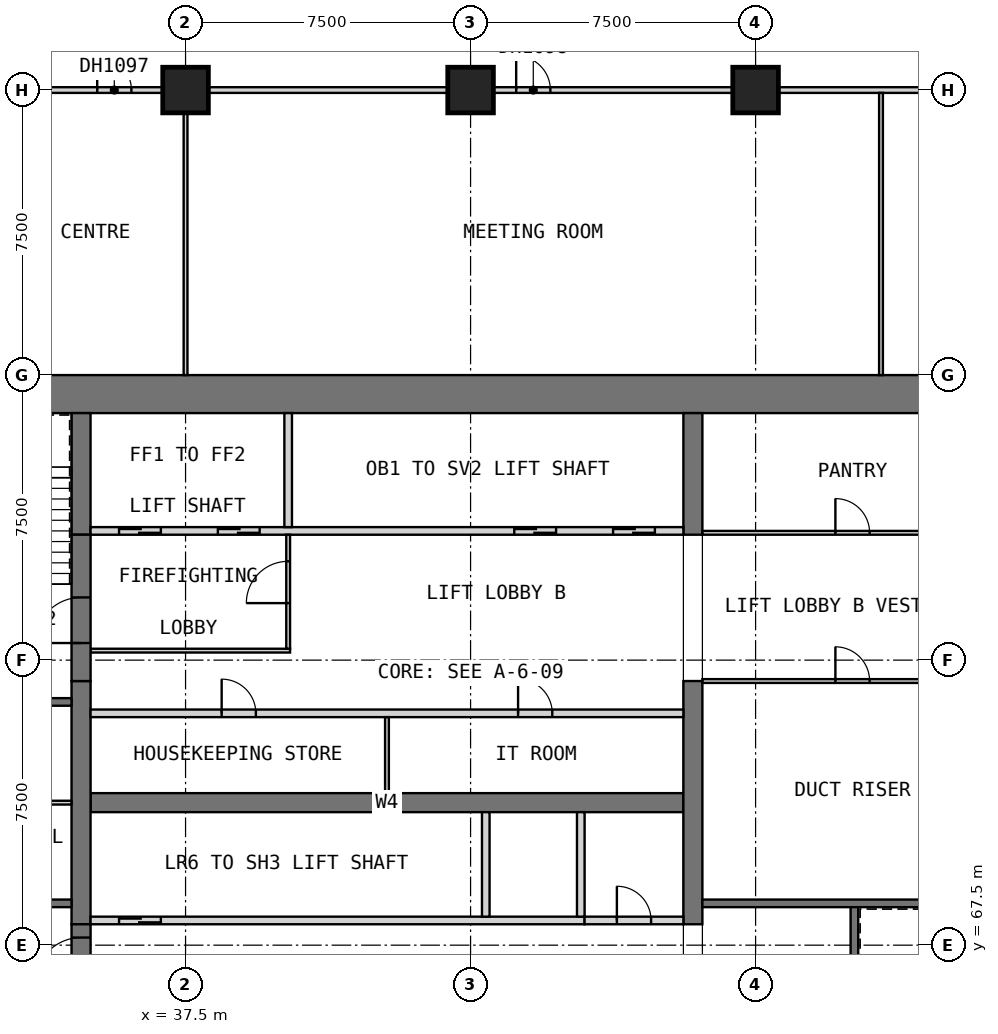
"""IFC4 building model, lengths in metres.
Left out: names, types, materials, properties, quantities, classifications, styles, units other than length and angle.
Written with IfcOpenShell. Run it as: python <this file> out.ifc"""

import sys

from ifc_helpers import new_model, si_unit, direction, frame, frame_2d, origin, origin_2d, place, context, subcontext, project, spatial, rectangle, extrude, element, fill, save


model = new_model("IFC4")
c1 = context("Model", 3, precision=1e-05, world=origin(), true_north=direction((0.0, 1.0)))
c2 = subcontext(c1, "Body", "Model", "MODEL_VIEW")
j1 = project(units=[si_unit("LENGTHUNIT", "METRE"), si_unit("PLANEANGLEUNIT", "RADIAN")], contexts=[c1])
p1 = place(None, origin())
s1 = spatial("IfcSite", under=j1, at=p1, CompositionType="ELEMENT")
p2 = place(p1, origin())
s2 = spatial("IfcBuilding", under=s1, at=p2, CompositionType="ELEMENT")
p3 = place(p2, frame((0.0, 0.0, 34.0)))
s3 = spatial("IfcBuildingStorey", under=s2, at=p3, CompositionType="ELEMENT", Elevation=34.0)
for number, where, z_axis, x_axis in (
    (1, (37.5, 90.0, 0.0), (0.0, 0.0, 1.0), (1.0, 0.0, 0.0)),
    (2, (45.0, 90.0, 0.0), (0.0, 0.0, 1.0), (1.0, 0.0, 0.0)),
    (3, (52.5, 90.0, 0.0), (0.0, 0.0, 1.0), (1.0, 0.0, 0.0)),
):
    element("IfcColumn", number, at=place(p3, frame(where, z_axis=z_axis, x_axis=x_axis)), inside=s3, PredefinedType="COLUMN", context=c2, shape_type="SweptSolid", body=[
        extrude(rectangle(XDim=1.2, YDim=1.2, at=origin_2d()), origin(), (0.0, 0.0, 1.0), 3.6),
    ])
p4 = place(p3, frame((30.0, 82.0, 0.0), z_axis=(0.0, 0.0, 1.0), x_axis=(1.0, 0.0, 0.0)))
e4 = element("IfcWall", 4, at=p4, inside=s3, PredefinedType="SHEAR", context=c2, shape_type="SweptSolid", body=[
    extrude(rectangle(XDim=30.0, YDim=1.0, at=frame_2d((15.0, 0.0))), origin(), (0.0, 0.0, 1.0), 3.6),
])
p5 = place(p3, frame((35.0, 71.25, 0.0), z_axis=(0.0, 0.0, 1.0), x_axis=(1.0, 0.0, 0.0)))
e5 = element("IfcWall", 5, at=p5, inside=s3, PredefinedType="SHEAR", context=c2, shape_type="SweptSolid", body=[
    extrude(rectangle(XDim=15.6, YDim=0.5, at=frame_2d((7.8, 0.0))), origin(), (0.0, 0.0, 1.0), 3.6),
])
p6 = place(p3, frame((34.75, 68.05, 0.0), z_axis=(0.0, 0.0, 1.0), x_axis=(0.0, 1.0, 0.0)))
e6 = element("IfcWall", 6, at=p6, inside=s3, PredefinedType="SHEAR", context=c2, shape_type="SweptSolid", body=[
    extrude(rectangle(XDim=6.4, YDim=0.5, at=frame_2d((3.2, 0.0))), origin(), (0.0, 0.0, 1.0), 3.6),
])
p7 = place(p3, frame((34.75, 78.3, 0.0), z_axis=(0.0, 0.0, 1.0), x_axis=(0.0, 1.0, 0.0)))
e7 = element("IfcWall", 7, at=p7, inside=s3, PredefinedType="SHEAR", context=c2, shape_type="SweptSolid", body=[
    extrude(rectangle(XDim=3.2, YDim=0.5, at=frame_2d((1.6, 0.0))), origin(), (0.0, 0.0, 1.0), 3.6),
])
p8 = place(p3, frame((50.85, 68.05, 0.0), z_axis=(0.0, 0.0, 1.0), x_axis=(0.0, 1.0, 0.0)))
e8 = element("IfcWall", 8, at=p8, inside=s3, PredefinedType="SHEAR", context=c2, shape_type="SweptSolid", body=[
    extrude(rectangle(XDim=6.4, YDim=0.5, at=frame_2d((3.2, 0.0))), origin(), (0.0, 0.0, 1.0), 3.6),
])
p9 = place(p3, frame((50.85, 78.3, 0.0), z_axis=(0.0, 0.0, 1.0), x_axis=(0.0, 1.0, 0.0)))
e9 = element("IfcWall", 9, at=p9, inside=s3, PredefinedType="SHEAR", context=c2, shape_type="SweptSolid", body=[
    extrude(rectangle(XDim=3.2, YDim=0.5, at=frame_2d((1.6, 0.0))), origin(), (0.0, 0.0, 1.0), 3.6),
])
p10 = place(p3, frame((35.0, 68.15, 0.0), z_axis=(0.0, 0.0, 1.0), x_axis=(1.0, 0.0, 0.0)))
e10 = element("IfcWall", 10, at=p10, inside=s3, PredefinedType="SOLIDWALL", context=c2, shape_type="SweptSolid", body=[
    extrude(rectangle(XDim=13.0, YDim=0.2, at=frame_2d((6.5, 0.0))), origin(), (0.0, 0.0, 1.0), 3.6),
])
p11 = place(p10, frame((0.75, 0.0, 0.0)))
e11 = element("IfcOpeningElement", 11, at=p11, cuts=e10, PredefinedType="OPENING", context=c2, shape_type="SweptSolid", body=[
    extrude(rectangle(XDim=1.1, YDim=2.1, at=frame_2d((0.55, 1.05))), frame((0.0, 0.11, 0.0), z_axis=(0.0, -1.0, 0.0), x_axis=(1.0, 0.0, 0.0)), (0.0, 0.0, 1.0), 0.22),
])
for number, where, z_axis, x_axis in (
    (12, (45.4, 68.25, 0.0), (0.0, 0.0, 1.0), (0.0, 1.0, 0.0)),
    (13, (47.9, 68.25, 0.0), (0.0, 0.0, 1.0), (0.0, 1.0, 0.0)),
):
    element("IfcWall", number, at=place(p3, frame(where, z_axis=z_axis, x_axis=x_axis)), inside=s3, PredefinedType="SOLIDWALL", context=c2, shape_type="SweptSolid", body=[
        extrude(rectangle(XDim=2.75, YDim=0.2, at=frame_2d((1.375, 0.0))), origin(), (0.0, 0.0, 1.0), 3.6),
    ])
p12 = place(p3, frame((48.0, 68.15, 0.0), z_axis=(0.0, 0.0, 1.0), x_axis=(1.0, 0.0, 0.0)))
e14 = element("IfcWall", 14, at=p12, inside=s3, PredefinedType="PARTITIONING", context=c2, shape_type="SweptSolid", body=[
    extrude(rectangle(XDim=2.6, YDim=0.2, at=frame_2d((1.3, 0.0))), origin(), (0.0, 0.0, 1.0), 3.35),
])
p13 = place(p12, frame((0.85, 0.0, 0.0)))
e15 = element("IfcOpeningElement", 15, at=p13, cuts=e14, PredefinedType="OPENING", context=c2, shape_type="SweptSolid", body=[
    extrude(rectangle(XDim=0.9, YDim=2.1, at=frame_2d((0.45, 1.05))), frame((0.0, 0.11, 0.0), z_axis=(0.0, -1.0, 0.0), x_axis=(1.0, 0.0, 0.0)), (0.0, 0.0, 1.0), 0.22),
])
p14 = place(p3, frame((35.0, 73.6, 0.0), z_axis=(0.0, 0.0, 1.0), x_axis=(1.0, 0.0, 0.0)))
e16 = element("IfcWall", 16, at=p14, inside=s3, PredefinedType="PARTITIONING", context=c2, shape_type="SweptSolid", body=[
    extrude(rectangle(XDim=15.6, YDim=0.2, at=frame_2d((7.8, 0.0))), origin(), (0.0, 0.0, 1.0), 3.35),
])
p15 = place(p14, frame((3.45, 0.0, 0.0)))
e17 = element("IfcOpeningElement", 17, at=p15, cuts=e16, PredefinedType="OPENING", context=c2, shape_type="SweptSolid", body=[
    extrude(rectangle(XDim=0.9, YDim=2.1, at=frame_2d((0.45, 1.05))), frame((0.0, 0.11, 0.0), z_axis=(0.0, -1.0, 0.0), x_axis=(1.0, 0.0, 0.0)), (0.0, 0.0, 1.0), 0.22),
])
p16 = place(p14, frame((11.25, 0.0, 0.0)))
e18 = element("IfcOpeningElement", 18, at=p16, cuts=e16, PredefinedType="OPENING", context=c2, shape_type="SweptSolid", body=[
    extrude(rectangle(XDim=0.9, YDim=2.1, at=frame_2d((0.45, 1.05))), frame((0.0, 0.11, 0.0), z_axis=(0.0, -1.0, 0.0), x_axis=(1.0, 0.0, 0.0)), (0.0, 0.0, 1.0), 0.22),
])
p17 = place(p3, frame((42.8, 71.5, 0.0), z_axis=(0.0, 0.0, 1.0), x_axis=(0.0, 1.0, 0.0)))
e19 = element("IfcWall", 19, at=p17, inside=s3, PredefinedType="PARTITIONING", context=c2, shape_type="SweptSolid", body=[
    extrude(rectangle(XDim=2.0, YDim=0.1, at=frame_2d((1.0, 0.0))), origin(), (0.0, 0.0, 1.0), 3.35),
])
p18 = place(p3, frame((35.0, 78.4, 0.0), z_axis=(0.0, 0.0, 1.0), x_axis=(1.0, 0.0, 0.0)))
e20 = element("IfcWall", 20, at=p18, inside=s3, PredefinedType="SOLIDWALL", context=c2, shape_type="SweptSolid", body=[
    extrude(rectangle(XDim=15.6, YDim=0.2, at=frame_2d((7.8, 0.0))), origin(), (0.0, 0.0, 1.0), 3.6),
])
p19 = place(p18, frame((0.75, 0.0, 0.0)))
e21 = element("IfcOpeningElement", 21, at=p19, cuts=e20, PredefinedType="OPENING", context=c2, shape_type="SweptSolid", body=[
    extrude(rectangle(XDim=1.1, YDim=2.1, at=frame_2d((0.55, 1.05))), frame((0.0, 0.11, 0.0), z_axis=(0.0, -1.0, 0.0), x_axis=(1.0, 0.0, 0.0)), (0.0, 0.0, 1.0), 0.22),
])
p20 = place(p18, frame((3.35, 0.0, 0.0)))
e22 = element("IfcOpeningElement", 22, at=p20, cuts=e20, PredefinedType="OPENING", context=c2, shape_type="SweptSolid", body=[
    extrude(rectangle(XDim=1.1, YDim=2.1, at=frame_2d((0.55, 1.05))), frame((0.0, 0.11, 0.0), z_axis=(0.0, -1.0, 0.0), x_axis=(1.0, 0.0, 0.0)), (0.0, 0.0, 1.0), 0.22),
])
p21 = place(p18, frame((11.15, 0.0, 0.0)))
e23 = element("IfcOpeningElement", 23, at=p21, cuts=e20, PredefinedType="OPENING", context=c2, shape_type="SweptSolid", body=[
    extrude(rectangle(XDim=1.1, YDim=2.1, at=frame_2d((0.55, 1.05))), frame((0.0, 0.11, 0.0), z_axis=(0.0, -1.0, 0.0), x_axis=(1.0, 0.0, 0.0)), (0.0, 0.0, 1.0), 0.22),
])
p22 = place(p18, frame((13.75, 0.0, 0.0)))
e24 = element("IfcOpeningElement", 24, at=p22, cuts=e20, PredefinedType="OPENING", context=c2, shape_type="SweptSolid", body=[
    extrude(rectangle(XDim=1.1, YDim=2.1, at=frame_2d((0.55, 1.05))), frame((0.0, 0.11, 0.0), z_axis=(0.0, -1.0, 0.0), x_axis=(1.0, 0.0, 0.0)), (0.0, 0.0, 1.0), 0.22),
])
p23 = place(p3, frame((40.2, 78.5, 0.0), z_axis=(0.0, 0.0, 1.0), x_axis=(0.0, 1.0, 0.0)))
e25 = element("IfcWall", 25, at=p23, inside=s3, PredefinedType="SOLIDWALL", context=c2, shape_type="SweptSolid", body=[
    extrude(rectangle(XDim=3.0, YDim=0.2, at=frame_2d((1.5, 0.0))), origin(), (0.0, 0.0, 1.0), 3.6),
])
p24 = place(p3, frame((35.0, 75.25, 0.0), z_axis=(0.0, 0.0, 1.0), x_axis=(1.0, 0.0, 0.0)))
e26 = element("IfcWall", 26, at=p24, inside=s3, PredefinedType="PARTITIONING", context=c2, shape_type="SweptSolid", body=[
    extrude(rectangle(XDim=5.25, YDim=0.1, at=frame_2d((2.625, 0.0))), origin(), (0.0, 0.0, 1.0), 3.35),
])
p25 = place(p3, frame((40.2, 75.3, 0.0), z_axis=(0.0, 0.0, 1.0), x_axis=(0.0, 1.0, 0.0)))
e27 = element("IfcWall", 27, at=p25, inside=s3, PredefinedType="PARTITIONING", context=c2, shape_type="SweptSolid", body=[
    extrude(rectangle(XDim=3.0, YDim=0.1, at=frame_2d((1.5, 0.0))), origin(), (0.0, 0.0, 1.0), 3.35),
])
p26 = place(p25, frame((1.2, 0.0, 0.0)))
e28 = element("IfcOpeningElement", 28, at=p26, cuts=e27, PredefinedType="OPENING", context=c2, shape_type="SweptSolid", body=[
    extrude(rectangle(XDim=1.1, YDim=2.1, at=frame_2d((0.55, 1.05))), frame((0.0, 0.06, 0.0), z_axis=(0.0, -1.0, 0.0), x_axis=(1.0, 0.0, 0.0)), (0.0, 0.0, 1.0), 0.12),
])
p27 = place(p3, frame((34.75, 64.2, 0.0), z_axis=(0.0, 0.0, 1.0), x_axis=(0.0, 1.0, 0.0)))
e29 = element("IfcWall", 29, at=p27, inside=s3, PredefinedType="SOLIDWALL", context=c2, shape_type="SweptSolid", body=[
    extrude(rectangle(XDim=3.85, YDim=0.5, at=frame_2d((1.925, 0.0))), origin(), (0.0, 0.0, 1.0), 2.4),
])
p28 = place(p27, frame((2.3, 0.0, 0.0)))
e30 = element("IfcOpeningElement", 30, at=p28, cuts=e29, PredefinedType="OPENING", context=c2, shape_type="SweptSolid", body=[
    extrude(rectangle(XDim=1.2, YDim=2.1, at=frame_2d((0.6, 1.05))), frame((0.0, 0.26, 0.0), z_axis=(0.0, -1.0, 0.0), x_axis=(1.0, 0.0, 0.0)), (0.0, 0.0, 1.0), 0.52),
])
p29 = place(p3, frame((34.75, 74.45, 0.0), z_axis=(0.0, 0.0, 1.0), x_axis=(0.0, 1.0, 0.0)))
e31 = element("IfcWall", 31, at=p29, inside=s3, PredefinedType="SOLIDWALL", context=c2, shape_type="SweptSolid", body=[
    extrude(rectangle(XDim=3.85, YDim=0.5, at=frame_2d((1.925, 0.0))), origin(), (0.0, 0.0, 1.0), 2.4),
])
p30 = place(p29, frame((1.0, 0.0, 0.0)))
e32 = element("IfcOpeningElement", 32, at=p30, cuts=e31, PredefinedType="OPENING", context=c2, shape_type="SweptSolid", body=[
    extrude(rectangle(XDim=1.2, YDim=2.1, at=frame_2d((0.6, 1.05))), frame((0.0, 0.26, 0.0), z_axis=(0.0, -1.0, 0.0), x_axis=(1.0, 0.0, 0.0)), (0.0, 0.0, 1.0), 0.52),
])
p31 = place(p3, frame((31.0, 68.6, 0.0), z_axis=(0.0, 0.0, 1.0), x_axis=(1.0, 0.0, 0.0)))
e33 = element("IfcWall", 33, at=p31, inside=s3, PredefinedType="SOLIDWALL", context=c2, shape_type="SweptSolid", body=[
    extrude(rectangle(XDim=3.5, YDim=0.2, at=frame_2d((1.75, 0.0))), origin(), (0.0, 0.0, 1.0), 3.35),
])
p32 = place(p31, frame((1.3, 0.0, 0.0)))
e34 = element("IfcOpeningElement", 34, at=p32, cuts=e33, PredefinedType="OPENING", context=c2, shape_type="SweptSolid", body=[
    extrude(rectangle(XDim=0.9, YDim=2.1, at=frame_2d((0.45, 1.05))), frame((0.0, 0.11, 0.0), z_axis=(0.0, -1.0, 0.0), x_axis=(1.0, 0.0, 0.0)), (0.0, 0.0, 1.0), 0.22),
])
p33 = place(p3, frame((31.0, 73.9, 0.0), z_axis=(0.0, 0.0, 1.0), x_axis=(1.0, 0.0, 0.0)))
e35 = element("IfcWall", 35, at=p33, inside=s3, PredefinedType="SOLIDWALL", context=c2, shape_type="SweptSolid", body=[
    extrude(rectangle(XDim=3.5, YDim=0.2, at=frame_2d((1.75, 0.0))), origin(), (0.0, 0.0, 1.0), 3.35),
])
p34 = place(p33, frame((1.3, 0.0, 0.0)))
e36 = element("IfcOpeningElement", 36, at=p34, cuts=e35, PredefinedType="OPENING", context=c2, shape_type="SweptSolid", body=[
    extrude(rectangle(XDim=0.9, YDim=2.1, at=frame_2d((0.45, 1.05))), frame((0.0, 0.11, 0.0), z_axis=(0.0, -1.0, 0.0), x_axis=(1.0, 0.0, 0.0)), (0.0, 0.0, 1.0), 0.22),
])
p35 = place(p3, frame((55.1, 61.0, 0.0), z_axis=(0.0, 0.0, 1.0), x_axis=(0.0, 1.0, 0.0)))
e37 = element("IfcWall", 37, at=p35, inside=s3, PredefinedType="SOLIDWALL", context=c2, shape_type="SweptSolid", body=[
    extrude(rectangle(XDim=7.6, YDim=0.2, at=frame_2d((3.8, 0.0))), origin(), (0.0, 0.0, 1.0), 3.35),
])
p36 = place(p3, frame((51.1, 68.6, 0.0), z_axis=(0.0, 0.0, 1.0), x_axis=(1.0, 0.0, 0.0)))
e38 = element("IfcWall", 38, at=p36, inside=s3, PredefinedType="SOLIDWALL", context=c2, shape_type="SweptSolid", body=[
    extrude(rectangle(XDim=7.9, YDim=0.2, at=frame_2d((3.95, 0.0))), origin(), (0.0, 0.0, 1.0), 3.35),
])
p37 = place(p3, frame((31.0, 71.25, 0.0), z_axis=(0.0, 0.0, 1.0), x_axis=(1.0, 0.0, 0.0)))
e39 = element("IfcWall", 39, at=p37, inside=s3, PredefinedType="PARTITIONING", context=c2, shape_type="SweptSolid", body=[
    extrude(rectangle(XDim=3.5, YDim=0.1, at=frame_2d((1.75, 0.0))), origin(), (0.0, 0.0, 1.0), 3.35),
])
p38 = place(p3, frame((51.1, 74.45, 0.0), z_axis=(0.0, 0.0, 1.0), x_axis=(1.0, 0.0, 0.0)))
e40 = element("IfcWall", 40, at=p38, inside=s3, PredefinedType="PARTITIONING", context=c2, shape_type="SweptSolid", body=[
    extrude(rectangle(XDim=7.9, YDim=0.1, at=frame_2d((3.95, 0.0))), origin(), (0.0, 0.0, 1.0), 3.35),
])
p39 = place(p38, frame((3.5, 0.0, 0.0)))
e41 = element("IfcOpeningElement", 41, at=p39, cuts=e40, PredefinedType="OPENING", context=c2, shape_type="SweptSolid", body=[
    extrude(rectangle(XDim=0.9, YDim=2.1, at=frame_2d((0.45, 1.05))), frame((0.0, 0.06, 0.0), z_axis=(0.0, -1.0, 0.0), x_axis=(1.0, 0.0, 0.0)), (0.0, 0.0, 1.0), 0.12),
])
p40 = place(p3, frame((51.1, 78.35, 0.0), z_axis=(0.0, 0.0, 1.0), x_axis=(1.0, 0.0, 0.0)))
e42 = element("IfcWall", 42, at=p40, inside=s3, PredefinedType="PARTITIONING", context=c2, shape_type="SweptSolid", body=[
    extrude(rectangle(XDim=7.9, YDim=0.1, at=frame_2d((3.95, 0.0))), origin(), (0.0, 0.0, 1.0), 3.35),
])
p41 = place(p40, frame((3.5, 0.0, 0.0)))
e43 = element("IfcOpeningElement", 43, at=p41, cuts=e42, PredefinedType="OPENING", context=c2, shape_type="SweptSolid", body=[
    extrude(rectangle(XDim=0.9, YDim=2.1, at=frame_2d((0.45, 1.05))), frame((0.0, 0.06, 0.0), z_axis=(0.0, -1.0, 0.0), x_axis=(1.0, 0.0, 0.0)), (0.0, 0.0, 1.0), 0.12),
])
p42 = place(p3, frame((33.75, 90.0, 0.0), z_axis=(0.0, 0.0, 1.0), x_axis=(1.0, 0.0, 0.0)))
e44 = element("IfcWall", 44, at=p42, inside=s3, PredefinedType="PARTITIONING", context=c2, shape_type="SweptSolid", body=[
    extrude(rectangle(XDim=41.25, YDim=0.15, at=frame_2d((20.625, 0.0))), origin(), (0.0, 0.0, 1.0), 3.35),
])
p43 = place(p42, frame((1.425, 0.0, 0.0)))
e45 = element("IfcOpeningElement", 45, at=p43, cuts=e44, PredefinedType="OPENING", context=c2, shape_type="SweptSolid", body=[
    extrude(rectangle(XDim=0.9, YDim=2.1, at=frame_2d((0.45, 1.05))), frame((0.0, 0.085, 0.0), z_axis=(0.0, -1.0, 0.0), x_axis=(1.0, 0.0, 0.0)), (0.0, 0.0, 1.0), 0.17),
])
p44 = place(p42, frame((12.45, 0.0, 0.0)))
e46 = element("IfcOpeningElement", 46, at=p44, cuts=e44, PredefinedType="OPENING", context=c2, shape_type="SweptSolid", body=[
    extrude(rectangle(XDim=0.9, YDim=2.1, at=frame_2d((0.45, 1.05))), frame((0.0, 0.085, 0.0), z_axis=(0.0, -1.0, 0.0), x_axis=(1.0, 0.0, 0.0)), (0.0, 0.0, 1.0), 0.17),
])
for number, where, z_axis, x_axis in (
    (47, (37.5, 82.5, 0.0), (0.0, 0.0, 1.0), (0.0, 1.0, 0.0)),
    (48, (55.8, 82.5, 0.0), (0.0, 0.0, 1.0), (0.0, 1.0, 0.0)),
):
    element("IfcWall", number, at=place(p3, frame(where, z_axis=z_axis, x_axis=x_axis)), inside=s3, PredefinedType="PARTITIONING", context=c2, shape_type="SweptSolid", body=[
        extrude(rectangle(XDim=7.425, YDim=0.1, at=frame_2d((3.712, 0.0))), origin(), (0.0, 0.0, 1.0), 3.35),
    ])
p45 = place(p11, origin())
e49 = element("IfcDoor", 49, at=p45, inside=s3, OperationType="DOUBLE_DOOR_SLIDING", PredefinedType="DOOR", context=c2, shape_type="SweptSolid", body=[
    extrude(rectangle(XDim=1.1, YDim=2.1, at=frame_2d((0.55, 1.05))), frame((0.0, 0.025, 0.0), z_axis=(0.0, -1.0, 0.0), x_axis=(1.0, 0.0, 0.0)), (0.0, 0.0, 1.0), 0.05),
])
fill(e11, e49)
p46 = place(p13, origin())
e50 = element("IfcDoor", 50, at=p46, inside=s3, OperationType="SINGLE_SWING_RIGHT", PredefinedType="DOOR", context=c2, shape_type="SweptSolid", body=[
    extrude(rectangle(XDim=0.9, YDim=2.1, at=frame_2d((0.45, 1.05))), frame((0.0, 0.025, 0.0), z_axis=(0.0, -1.0, 0.0), x_axis=(1.0, 0.0, 0.0)), (0.0, 0.0, 1.0), 0.05),
])
fill(e15, e50)
p47 = place(p15, origin())
e51 = element("IfcDoor", 51, at=p47, inside=s3, OperationType="SINGLE_SWING_RIGHT", PredefinedType="DOOR", context=c2, shape_type="SweptSolid", body=[
    extrude(rectangle(XDim=0.9, YDim=2.1, at=frame_2d((0.45, 1.05))), frame((0.0, 0.025, 0.0), z_axis=(0.0, -1.0, 0.0), x_axis=(1.0, 0.0, 0.0)), (0.0, 0.0, 1.0), 0.05),
])
fill(e17, e51)
p48 = place(p16, origin())
e52 = element("IfcDoor", 52, at=p48, inside=s3, OperationType="SINGLE_SWING_LEFT", PredefinedType="DOOR", context=c2, shape_type="SweptSolid", body=[
    extrude(rectangle(XDim=0.9, YDim=2.1, at=frame_2d((0.45, 1.05))), frame((0.0, 0.025, 0.0), z_axis=(0.0, -1.0, 0.0), x_axis=(1.0, 0.0, 0.0)), (0.0, 0.0, 1.0), 0.05),
])
fill(e18, e52)
p49 = place(p19, origin())
e53 = element("IfcDoor", 53, at=p49, inside=s3, OperationType="DOUBLE_DOOR_SLIDING", PredefinedType="DOOR", context=c2, shape_type="SweptSolid", body=[
    extrude(rectangle(XDim=1.1, YDim=2.1, at=frame_2d((0.55, 1.05))), frame((0.0, 0.025, 0.0), z_axis=(0.0, -1.0, 0.0), x_axis=(1.0, 0.0, 0.0)), (0.0, 0.0, 1.0), 0.05),
])
fill(e21, e53)
p50 = place(p20, origin())
e54 = element("IfcDoor", 54, at=p50, inside=s3, OperationType="DOUBLE_DOOR_SLIDING", PredefinedType="DOOR", context=c2, shape_type="SweptSolid", body=[
    extrude(rectangle(XDim=1.1, YDim=2.1, at=frame_2d((0.55, 1.05))), frame((0.0, 0.025, 0.0), z_axis=(0.0, -1.0, 0.0), x_axis=(1.0, 0.0, 0.0)), (0.0, 0.0, 1.0), 0.05),
])
fill(e22, e54)
p51 = place(p21, origin())
e55 = element("IfcDoor", 55, at=p51, inside=s3, OperationType="DOUBLE_DOOR_SLIDING", PredefinedType="DOOR", context=c2, shape_type="SweptSolid", body=[
    extrude(rectangle(XDim=1.1, YDim=2.1, at=frame_2d((0.55, 1.05))), frame((0.0, 0.025, 0.0), z_axis=(0.0, -1.0, 0.0), x_axis=(1.0, 0.0, 0.0)), (0.0, 0.0, 1.0), 0.05),
])
fill(e23, e55)
p52 = place(p22, origin())
e56 = element("IfcDoor", 56, at=p52, inside=s3, OperationType="DOUBLE_DOOR_SLIDING", PredefinedType="DOOR", context=c2, shape_type="SweptSolid", body=[
    extrude(rectangle(XDim=1.1, YDim=2.1, at=frame_2d((0.55, 1.05))), frame((0.0, 0.025, 0.0), z_axis=(0.0, -1.0, 0.0), x_axis=(1.0, 0.0, 0.0)), (0.0, 0.0, 1.0), 0.05),
])
fill(e24, e56)
p53 = place(p26, origin())
e57 = element("IfcDoor", 57, at=p53, inside=s3, OperationType="SINGLE_SWING_LEFT", PredefinedType="DOOR", context=c2, shape_type="SweptSolid", body=[
    extrude(rectangle(XDim=1.1, YDim=2.1, at=frame_2d((0.55, 1.05))), frame((0.0, 0.025, 0.0), z_axis=(0.0, -1.0, 0.0), x_axis=(1.0, 0.0, 0.0)), (0.0, 0.0, 1.0), 0.05),
])
fill(e28, e57)
p54 = place(p28, origin())
e58 = element("IfcDoor", 58, at=p54, inside=s3, OperationType="SINGLE_SWING_LEFT", PredefinedType="DOOR", context=c2, shape_type="SweptSolid", body=[
    extrude(rectangle(XDim=1.2, YDim=2.1, at=frame_2d((0.6, 1.05))), frame((0.0, 0.025, 0.0), z_axis=(0.0, -1.0, 0.0), x_axis=(1.0, 0.0, 0.0)), (0.0, 0.0, 1.0), 0.05),
])
fill(e30, e58)
p55 = place(p30, origin())
e59 = element("IfcDoor", 59, at=p55, inside=s3, OperationType="SINGLE_SWING_RIGHT", PredefinedType="DOOR", context=c2, shape_type="SweptSolid", body=[
    extrude(rectangle(XDim=1.2, YDim=2.1, at=frame_2d((0.6, 1.05))), frame((0.0, 0.025, 0.0), z_axis=(0.0, -1.0, 0.0), x_axis=(1.0, 0.0, 0.0)), (0.0, 0.0, 1.0), 0.05),
])
fill(e32, e59)
p56 = place(p39, origin())
e60 = element("IfcDoor", 60, at=p56, inside=s3, OperationType="SINGLE_SWING_RIGHT", PredefinedType="DOOR", context=c2, shape_type="SweptSolid", body=[
    extrude(rectangle(XDim=0.9, YDim=2.1, at=frame_2d((0.45, 1.05))), frame((0.0, 0.025, 0.0), z_axis=(0.0, -1.0, 0.0), x_axis=(1.0, 0.0, 0.0)), (0.0, 0.0, 1.0), 0.05),
])
fill(e41, e60)
p57 = place(p41, origin())
e61 = element("IfcDoor", 61, at=p57, inside=s3, OperationType="SINGLE_SWING_RIGHT", PredefinedType="DOOR", context=c2, shape_type="SweptSolid", body=[
    extrude(rectangle(XDim=0.9, YDim=2.1, at=frame_2d((0.45, 1.05))), frame((0.0, 0.025, 0.0), z_axis=(0.0, -1.0, 0.0), x_axis=(1.0, 0.0, 0.0)), (0.0, 0.0, 1.0), 0.05),
])
fill(e43, e61)
p58 = place(p43, origin())
e62 = element("IfcDoor", 62, at=p58, inside=s3, OperationType="SINGLE_SWING_RIGHT", PredefinedType="DOOR", context=c2, shape_type="SweptSolid", body=[
    extrude(rectangle(XDim=0.9, YDim=2.1, at=frame_2d((0.45, 1.05))), frame((0.0, 0.025, 0.0), z_axis=(0.0, -1.0, 0.0), x_axis=(1.0, 0.0, 0.0)), (0.0, 0.0, 1.0), 0.05),
])
fill(e45, e62)
p59 = place(p44, origin())
e63 = element("IfcDoor", 63, at=p59, inside=s3, OperationType="SINGLE_SWING_RIGHT", PredefinedType="DOOR", context=c2, shape_type="SweptSolid", body=[
    extrude(rectangle(XDim=0.9, YDim=2.1, at=frame_2d((0.45, 1.05))), frame((0.0, 0.025, 0.0), z_axis=(0.0, -1.0, 0.0), x_axis=(1.0, 0.0, 0.0)), (0.0, 0.0, 1.0), 0.05),
])
fill(e46, e63)
save(model, sys.argv[1])
